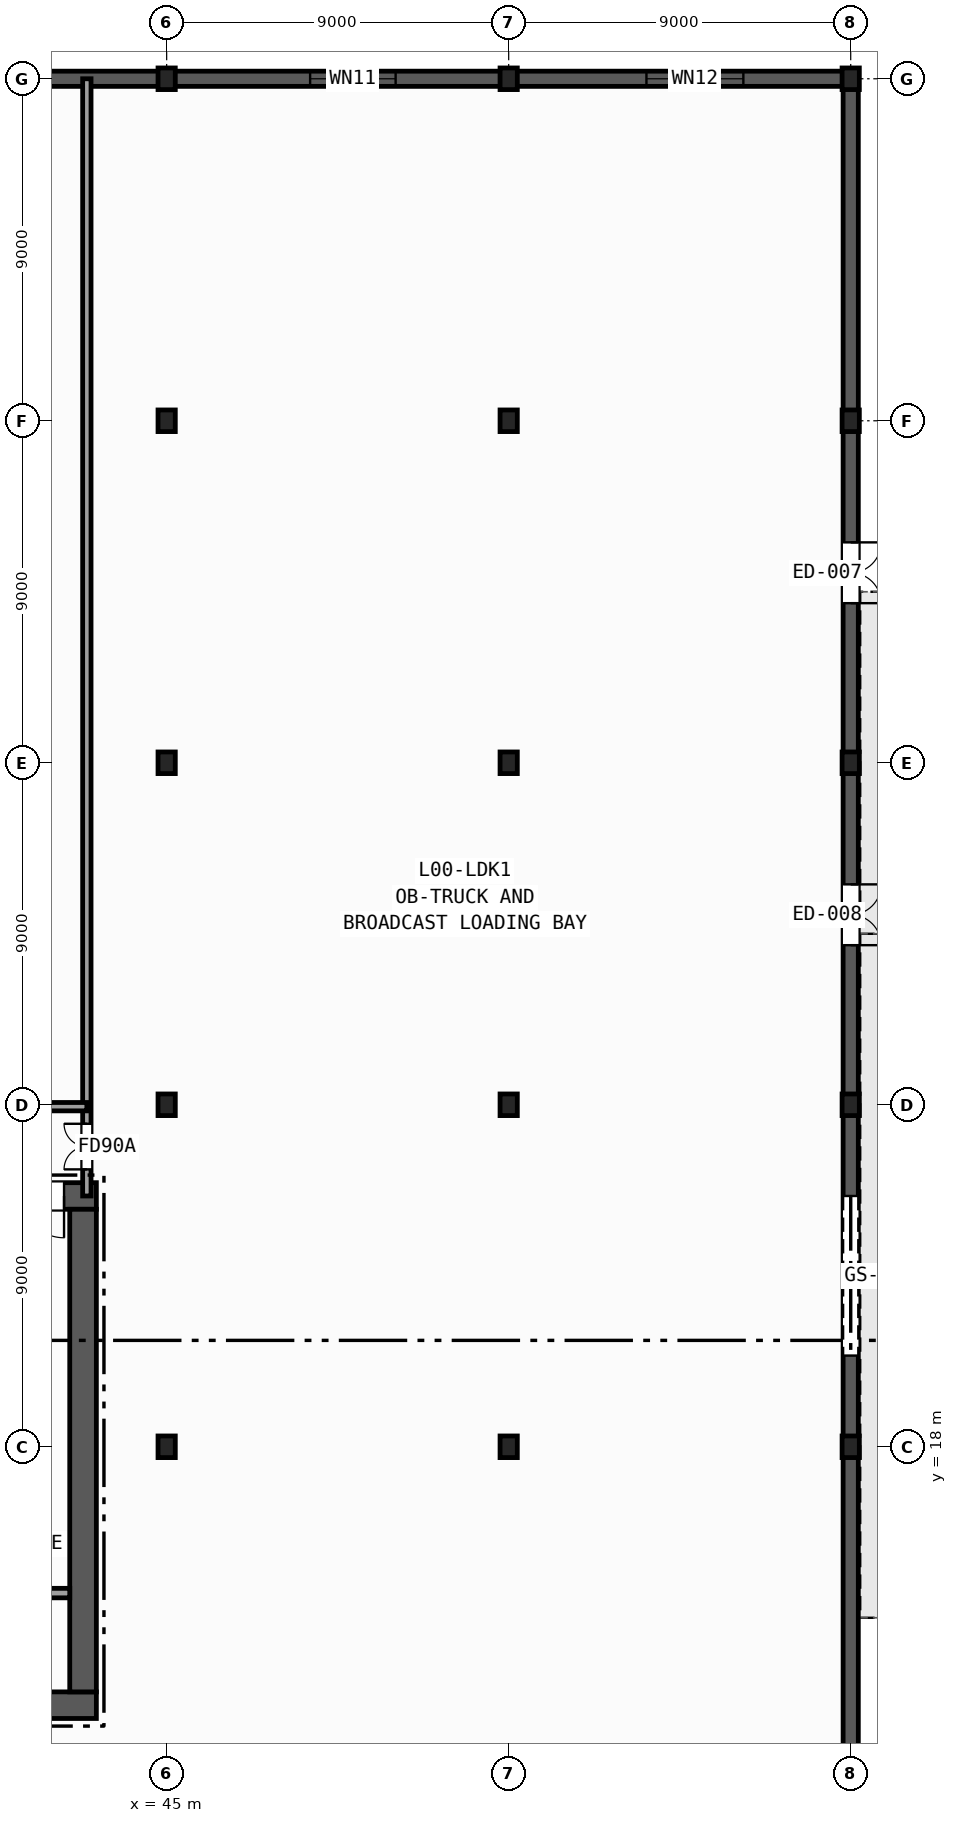
"""IFC4 building model, lengths in metres.
Left out: names, types, materials, properties, quantities, classifications, styles, units other than length and angle.
Written with IfcOpenShell. Run it as: python <this file> out.ifc"""

import sys

from ifc_helpers import new_model, si_unit, direction, frame, frame_2d, origin, origin_2d, place, context, subcontext, project, spatial, rectangle, i_section, extrude, element, fill, save


model = new_model("IFC4")
c1 = context("Model", 3, precision=1e-05, world=origin(), true_north=direction((0.0, 1.0)))
c2 = subcontext(c1, "Body", "Model", "MODEL_VIEW")
j1 = project(units=[si_unit("LENGTHUNIT", "METRE"), si_unit("PLANEANGLEUNIT", "RADIAN")], contexts=[c1])
p1 = place(None, origin())
s1 = spatial("IfcSite", under=j1, at=p1, CompositionType="ELEMENT")
p2 = place(p1, origin())
s2 = spatial("IfcBuilding", under=s1, at=p2, CompositionType="ELEMENT")
p3 = place(p2, origin())
s3 = spatial("IfcBuildingStorey", under=s2, at=p3, CompositionType="ELEMENT", Elevation=0.0)
for number, where, z_axis, x_axis in (
    (1, (45.0, 18.0, 0.0), (0.0, 0.0, 1.0), (1.0, 0.0, 0.0)),
    (2, (45.0, 27.0, 0.0), (0.0, 0.0, 1.0), (1.0, 0.0, 0.0)),
    (3, (45.0, 36.0, 0.0), (0.0, 0.0, 1.0), (1.0, 0.0, 0.0)),
    (4, (45.0, 45.0, 0.0), (0.0, 0.0, 1.0), (1.0, 0.0, 0.0)),
    (5, (45.0, 54.0, 0.0), (0.0, 0.0, 1.0), (1.0, 0.0, 0.0)),
    (6, (54.0, 18.0, 0.0), (0.0, 0.0, 1.0), (1.0, 0.0, 0.0)),
    (7, (54.0, 27.0, 0.0), (0.0, 0.0, 1.0), (1.0, 0.0, 0.0)),
    (8, (54.0, 36.0, 0.0), (0.0, 0.0, 1.0), (1.0, 0.0, 0.0)),
    (9, (54.0, 45.0, 0.0), (0.0, 0.0, 1.0), (1.0, 0.0, 0.0)),
    (10, (54.0, 54.0, 0.0), (0.0, 0.0, 1.0), (1.0, 0.0, 0.0)),
    (11, (63.0, 18.0, 0.0), (0.0, 0.0, 1.0), (1.0, 0.0, 0.0)),
    (12, (63.0, 27.0, 0.0), (0.0, 0.0, 1.0), (1.0, 0.0, 0.0)),
    (13, (63.0, 36.0, 0.0), (0.0, 0.0, 1.0), (1.0, 0.0, 0.0)),
    (14, (63.0, 45.0, 0.0), (0.0, 0.0, 1.0), (1.0, 0.0, 0.0)),
    (15, (63.0, 54.0, 0.0), (0.0, 0.0, 1.0), (1.0, 0.0, 0.0)),
):
    element("IfcColumn", number, at=place(p3, frame(where, z_axis=z_axis, x_axis=x_axis)), inside=s3, PredefinedType="COLUMN", context=c2, shape_type="SweptSolid", body=[
        extrude(i_section(OverallWidth=0.454, OverallDepth=0.569, WebThickness=0.078, FlangeThickness=0.125, FilletRadius=0.015, at=origin_2d()), origin(), (0.0, 0.0, 1.0), 5.8),
    ])
p4 = place(p3, frame((0.2, 54.0, 0.0), z_axis=(0.0, 0.0, 1.0), x_axis=(1.0, 0.0, 0.0)))
e16 = element("IfcWall", 16, at=p4, inside=s3, PredefinedType="SOLIDWALL", context=c2, shape_type="SweptSolid", body=[
    extrude(rectangle(XDim=62.6, YDim=0.4, at=frame_2d((31.3, 0.0))), origin(), (0.0, 0.0, 1.0), 5.48),
])
p5 = place(p4, frame((4.1, 0.0, 1.1)))
e17 = element("IfcOpeningElement", 17, at=p5, cuts=e16, PredefinedType="OPENING", context=c2, shape_type="SweptSolid", body=[
    extrude(rectangle(XDim=1.2, YDim=1.5, at=frame_2d((0.6, 0.75))), frame((0.0, 0.21, 0.0), z_axis=(0.0, -1.0, 0.0), x_axis=(1.0, 0.0, 0.0)), (0.0, 0.0, 1.0), 0.42),
])
p6 = place(p4, frame((12.5, 0.0, 1.1)))
e18 = element("IfcOpeningElement", 18, at=p6, cuts=e16, PredefinedType="OPENING", context=c2, shape_type="SweptSolid", body=[
    extrude(rectangle(XDim=2.4, YDim=1.95, at=frame_2d((1.2, 0.975))), frame((0.0, 0.21, 0.0), z_axis=(0.0, -1.0, 0.0), x_axis=(1.0, 0.0, 0.0)), (0.0, 0.0, 1.0), 0.42),
])
p7 = place(p4, frame((21.35, 0.0, 1.1)))
e19 = element("IfcOpeningElement", 19, at=p7, cuts=e16, PredefinedType="OPENING", context=c2, shape_type="SweptSolid", body=[
    extrude(rectangle(XDim=2.7, YDim=2.1, at=frame_2d((1.35, 1.05))), frame((0.0, 0.21, 0.0), z_axis=(0.0, -1.0, 0.0), x_axis=(1.0, 0.0, 0.0)), (0.0, 0.0, 1.0), 0.42),
])
p8 = place(p4, frame((30.2, 0.0, 1.1)))
e20 = element("IfcOpeningElement", 20, at=p8, cuts=e16, PredefinedType="OPENING", context=c2, shape_type="SweptSolid", body=[
    extrude(rectangle(XDim=3.0, YDim=2.25, at=frame_2d((1.5, 1.125))), frame((0.0, 0.21, 0.0), z_axis=(0.0, -1.0, 0.0), x_axis=(1.0, 0.0, 0.0)), (0.0, 0.0, 1.0), 0.42),
])
p9 = place(p4, frame((48.575, 0.0, 1.1)))
e21 = element("IfcOpeningElement", 21, at=p9, cuts=e16, PredefinedType="OPENING", context=c2, shape_type="SweptSolid", body=[
    extrude(rectangle(XDim=2.25, YDim=2.1, at=frame_2d((1.125, 1.05))), frame((0.0, 0.21, 0.0), z_axis=(0.0, -1.0, 0.0), x_axis=(1.0, 0.0, 0.0)), (0.0, 0.0, 1.0), 0.42),
])
p10 = place(p4, frame((57.425, 0.0, 1.1)))
e22 = element("IfcOpeningElement", 22, at=p10, cuts=e16, PredefinedType="OPENING", context=c2, shape_type="SweptSolid", body=[
    extrude(rectangle(XDim=2.55, YDim=2.25, at=frame_2d((1.275, 1.125))), frame((0.0, 0.21, 0.0), z_axis=(0.0, -1.0, 0.0), x_axis=(1.0, 0.0, 0.0)), (0.0, 0.0, 1.0), 0.42),
])
p11 = place(p3, frame((63.0, 54.2, 0.0), z_axis=(0.0, 0.0, 1.0), x_axis=(0.0, -1.0, 0.0)))
e23 = element("IfcWall", 23, at=p11, inside=s3, PredefinedType="SOLIDWALL", context=c2, shape_type="SweptSolid", body=[
    extrude(rectangle(XDim=54.4, YDim=0.4, at=frame_2d((27.2, 0.0))), origin(), (0.0, 0.0, 1.0), 5.48),
])
p12 = place(p11, frame((46.9, 0.0, 0.0)))
e24 = element("IfcOpeningElement", 24, at=p12, cuts=e23, PredefinedType="OPENING", context=c2, shape_type="SweptSolid", body=[
    extrude(rectangle(XDim=1.9, YDim=2.2, at=frame_2d((0.95, 1.1))), frame((0.0, 0.21, 0.0), z_axis=(0.0, -1.0, 0.0), x_axis=(1.0, 0.0, 0.0)), (0.0, 0.0, 1.0), 0.42),
])
p13 = place(p11, frame((12.4, 0.0, 0.0)))
e25 = element("IfcOpeningElement", 25, at=p13, cuts=e23, PredefinedType="OPENING", context=c2, shape_type="SweptSolid", body=[
    extrude(rectangle(XDim=1.6, YDim=2.2, at=frame_2d((0.8, 1.1))), frame((0.0, 0.21, 0.0), z_axis=(0.0, -1.0, 0.0), x_axis=(1.0, 0.0, 0.0)), (0.0, 0.0, 1.0), 0.42),
])
p14 = place(p11, frame((21.4, 0.0, 0.0)))
e26 = element("IfcOpeningElement", 26, at=p14, cuts=e23, PredefinedType="OPENING", context=c2, shape_type="SweptSolid", body=[
    extrude(rectangle(XDim=1.6, YDim=2.2, at=frame_2d((0.8, 1.1))), frame((0.0, 0.21, 0.0), z_axis=(0.0, -1.0, 0.0), x_axis=(1.0, 0.0, 0.0)), (0.0, 0.0, 1.0), 0.42),
])
p15 = place(p11, frame((29.6, 0.0, 0.0)))
e27 = element("IfcOpeningElement", 27, at=p15, cuts=e23, PredefinedType="OPENING", context=c2, shape_type="SweptSolid", body=[
    extrude(rectangle(XDim=4.2, YDim=3.8, at=frame_2d((2.1, 1.9))), frame((0.0, 0.21, 0.0), z_axis=(0.0, -1.0, 0.0), x_axis=(1.0, 0.0, 0.0)), (0.0, 0.0, 1.0), 0.42),
])
p16 = place(p3, frame((43.15, 11.2, 0.0), z_axis=(0.0, 0.0, 1.0), x_axis=(-1.0, 0.0, 0.0)))
e28 = element("IfcWall", 28, at=p16, inside=s3, PredefinedType="SHEAR", context=c2, shape_type="SweptSolid", body=[
    extrude(rectangle(XDim=14.1, YDim=0.7, at=frame_2d((7.05, 0.0))), origin(), (0.0, 0.0, 1.0), 5.48),
])
p17 = place(p3, frame((43.15, 24.6, 0.0), z_axis=(0.0, 0.0, 1.0), x_axis=(-1.0, 0.0, 0.0)))
e29 = element("IfcWall", 29, at=p17, inside=s3, PredefinedType="SHEAR", context=c2, shape_type="SweptSolid", body=[
    extrude(rectangle(XDim=14.1, YDim=0.7, at=frame_2d((7.05, 0.0))), origin(), (0.0, 0.0, 1.0), 5.48),
])
p18 = place(p17, frame((0.85, 0.0, 0.0)))
e30 = element("IfcOpeningElement", 30, at=p18, cuts=e29, PredefinedType="OPENING", context=c2, shape_type="SweptSolid", body=[
    extrude(rectangle(XDim=1.1, YDim=2.15, at=frame_2d((0.55, 1.075))), frame((0.0, 0.36, 0.0), z_axis=(0.0, -1.0, 0.0), x_axis=(1.0, 0.0, 0.0)), (0.0, 0.0, 1.0), 0.72),
])
p19 = place(p17, frame((2.35, 0.0, 0.0)))
e31 = element("IfcOpeningElement", 31, at=p19, cuts=e29, PredefinedType="OPENING", context=c2, shape_type="SweptSolid", body=[
    extrude(rectangle(XDim=0.9, YDim=2.1, at=frame_2d((0.45, 1.05))), frame((0.0, 0.36, 0.0), z_axis=(0.0, -1.0, 0.0), x_axis=(1.0, 0.0, 0.0)), (0.0, 0.0, 1.0), 0.72),
])
p20 = place(p17, frame((3.65, 0.0, 0.0)))
e32 = element("IfcOpeningElement", 32, at=p20, cuts=e29, PredefinedType="OPENING", context=c2, shape_type="SweptSolid", body=[
    extrude(rectangle(XDim=0.9, YDim=2.1, at=frame_2d((0.45, 1.05))), frame((0.0, 0.36, 0.0), z_axis=(0.0, -1.0, 0.0), x_axis=(1.0, 0.0, 0.0)), (0.0, 0.0, 1.0), 0.72),
])
p21 = place(p17, frame((5.0, 0.0, 0.0)))
e33 = element("IfcOpeningElement", 33, at=p21, cuts=e29, PredefinedType="OPENING", context=c2, shape_type="SweptSolid", body=[
    extrude(rectangle(XDim=0.9, YDim=2.1, at=frame_2d((0.45, 1.05))), frame((0.0, 0.36, 0.0), z_axis=(0.0, -1.0, 0.0), x_axis=(1.0, 0.0, 0.0)), (0.0, 0.0, 1.0), 0.72),
])
p22 = place(p3, frame((42.8, 11.55, 0.0), z_axis=(0.0, 0.0, 1.0), x_axis=(0.0, 1.0, 0.0)))
e34 = element("IfcWall", 34, at=p22, inside=s3, PredefinedType="SHEAR", context=c2, shape_type="SweptSolid", body=[
    extrude(rectangle(XDim=12.7, YDim=0.7, at=frame_2d((6.35, 0.0))), origin(), (0.0, 0.0, 1.0), 5.48),
])
p23 = place(p3, frame((33.07, 14.15, 0.0), z_axis=(0.0, 0.0, 1.0), x_axis=(1.0, 0.0, 0.0)))
e35 = element("IfcWall", 35, at=p23, inside=s3, PredefinedType="PARTITIONING", context=c2, shape_type="SweptSolid", body=[
    extrude(rectangle(XDim=9.38, YDim=0.25, at=frame_2d((4.69, 0.0))), origin(), (0.0, 0.0, 1.0), 5.48),
])
p24 = place(p23, frame((0.755, 0.0, 0.0)))
e36 = element("IfcOpeningElement", 36, at=p24, cuts=e35, PredefinedType="OPENING", context=c2, shape_type="SweptSolid", body=[
    extrude(rectangle(XDim=1.15, YDim=2.15, at=frame_2d((0.575, 1.075))), frame((0.0, 0.135, 0.0), z_axis=(0.0, -1.0, 0.0), x_axis=(1.0, 0.0, 0.0)), (0.0, 0.0, 1.0), 0.27),
])
p25 = place(p23, frame((3.355, 0.0, 0.0)))
e37 = element("IfcOpeningElement", 37, at=p25, cuts=e35, PredefinedType="OPENING", context=c2, shape_type="SweptSolid", body=[
    extrude(rectangle(XDim=1.15, YDim=2.15, at=frame_2d((0.575, 1.075))), frame((0.0, 0.135, 0.0), z_axis=(0.0, -1.0, 0.0), x_axis=(1.0, 0.0, 0.0)), (0.0, 0.0, 1.0), 0.27),
])
p26 = place(p23, frame((6.055, 0.0, 0.0)))
e38 = element("IfcOpeningElement", 38, at=p26, cuts=e35, PredefinedType="OPENING", context=c2, shape_type="SweptSolid", body=[
    extrude(rectangle(XDim=1.15, YDim=2.15, at=frame_2d((0.575, 1.075))), frame((0.0, 0.135, 0.0), z_axis=(0.0, -1.0, 0.0), x_axis=(1.0, 0.0, 0.0)), (0.0, 0.0, 1.0), 0.27),
])
p27 = place(p3, frame((42.9, 24.6, 0.0), z_axis=(0.0, 0.0, 1.0), x_axis=(0.0, 1.0, 0.0)))
e39 = element("IfcWall", 39, at=p27, inside=s3, PredefinedType="PARTITIONING", context=c2, shape_type="SweptSolid", body=[
    extrude(rectangle(XDim=29.4, YDim=0.22, at=frame_2d((14.7, 0.0))), origin(), (0.0, 0.0, 1.0), 4.533),
])
p28 = place(p27, frame((0.7, 0.0, 0.0)))
e40 = element("IfcOpeningElement", 40, at=p28, cuts=e39, PredefinedType="OPENING", context=c2, shape_type="SweptSolid", body=[
    extrude(rectangle(XDim=1.2, YDim=2.15, at=frame_2d((0.6, 1.075))), frame((0.0, 0.12, 0.0), z_axis=(0.0, -1.0, 0.0), x_axis=(1.0, 0.0, 0.0)), (0.0, 0.0, 1.0), 0.24),
])
p29 = place(p3, frame((27.1, 26.95, 0.0), z_axis=(0.0, 0.0, 1.0), x_axis=(1.0, 0.0, 0.0)))
e41 = element("IfcWall", 41, at=p29, inside=s3, PredefinedType="PARTITIONING", context=c2, shape_type="SweptSolid", body=[
    extrude(rectangle(XDim=15.8, YDim=0.22, at=frame_2d((7.9, 0.0))), origin(), (0.0, 0.0, 1.0), 4.533),
])
p30 = place(p29, frame((4.5, 0.0, 0.0)))
e42 = element("IfcOpeningElement", 42, at=p30, cuts=e41, PredefinedType="OPENING", context=c2, shape_type="SweptSolid", body=[
    extrude(rectangle(XDim=1.2, YDim=2.15, at=frame_2d((0.6, 1.075))), frame((0.0, 0.12, 0.0), z_axis=(0.0, -1.0, 0.0), x_axis=(1.0, 0.0, 0.0)), (0.0, 0.0, 1.0), 0.24),
])
p31 = place(p13, origin())
e43 = element("IfcDoor", 43, at=p31, inside=s3, OperationType="DOUBLE_DOOR_SINGLE_SWING", PredefinedType="DOOR", context=c2, shape_type="SweptSolid", body=[
    extrude(rectangle(XDim=1.6, YDim=2.2, at=frame_2d((0.8, 1.1))), frame((0.0, 0.025, 0.0), z_axis=(0.0, -1.0, 0.0), x_axis=(1.0, 0.0, 0.0)), (0.0, 0.0, 1.0), 0.05),
])
fill(e25, e43)
p32 = place(p14, origin())
e44 = element("IfcDoor", 44, at=p32, inside=s3, OperationType="DOUBLE_DOOR_SINGLE_SWING", PredefinedType="DOOR", context=c2, shape_type="SweptSolid", body=[
    extrude(rectangle(XDim=1.6, YDim=2.2, at=frame_2d((0.8, 1.1))), frame((0.0, 0.025, 0.0), z_axis=(0.0, -1.0, 0.0), x_axis=(1.0, 0.0, 0.0)), (0.0, 0.0, 1.0), 0.05),
])
fill(e26, e44)
p33 = place(p15, origin())
e45 = element("IfcDoor", 45, at=p33, inside=s3, OperationType="ROLLINGUP", PredefinedType="GATE", context=c2, shape_type="SweptSolid", body=[
    extrude(rectangle(XDim=4.2, YDim=3.8, at=frame_2d((2.1, 1.9))), frame((0.0, 0.025, 0.0), z_axis=(0.0, -1.0, 0.0), x_axis=(1.0, 0.0, 0.0)), (0.0, 0.0, 1.0), 0.05),
])
fill(e27, e45)
p34 = place(p9, origin())
e46 = element("IfcWindow", 46, at=p34, inside=s3, PartitioningType="SINGLE_PANEL", PredefinedType="WINDOW", context=c2, shape_type="SweptSolid", body=[
    extrude(rectangle(XDim=2.25, YDim=2.1, at=frame_2d((1.125, 1.05))), frame((0.0, 0.03, 0.0), z_axis=(0.0, -1.0, 0.0), x_axis=(1.0, 0.0, 0.0)), (0.0, 0.0, 1.0), 0.06),
])
fill(e21, e46)
p35 = place(p10, origin())
e47 = element("IfcWindow", 47, at=p35, inside=s3, PartitioningType="SINGLE_PANEL", PredefinedType="WINDOW", context=c2, shape_type="SweptSolid", body=[
    extrude(rectangle(XDim=2.55, YDim=2.25, at=frame_2d((1.275, 1.125))), frame((0.0, 0.03, 0.0), z_axis=(0.0, -1.0, 0.0), x_axis=(1.0, 0.0, 0.0)), (0.0, 0.0, 1.0), 0.06),
])
fill(e22, e47)
p36 = place(p18, origin())
e48 = element("IfcDoor", 48, at=p36, inside=s3, OperationType="SINGLE_SWING_LEFT", PredefinedType="DOOR", context=c2, shape_type="SweptSolid", body=[
    extrude(rectangle(XDim=1.1, YDim=2.15, at=frame_2d((0.55, 1.075))), frame((0.0, 0.025, 0.0), z_axis=(0.0, -1.0, 0.0), x_axis=(1.0, 0.0, 0.0)), (0.0, 0.0, 1.0), 0.05),
])
fill(e30, e48)
p37 = place(p28, origin())
e49 = element("IfcDoor", 49, at=p37, inside=s3, OperationType="DOUBLE_DOOR_SINGLE_SWING", PredefinedType="DOOR", context=c2, shape_type="SweptSolid", body=[
    extrude(rectangle(XDim=1.2, YDim=2.15, at=frame_2d((0.6, 1.075))), frame((0.0, 0.025, 0.0), z_axis=(0.0, -1.0, 0.0), x_axis=(1.0, 0.0, 0.0)), (0.0, 0.0, 1.0), 0.05),
])
fill(e40, e49)
save(model, sys.argv[1])
